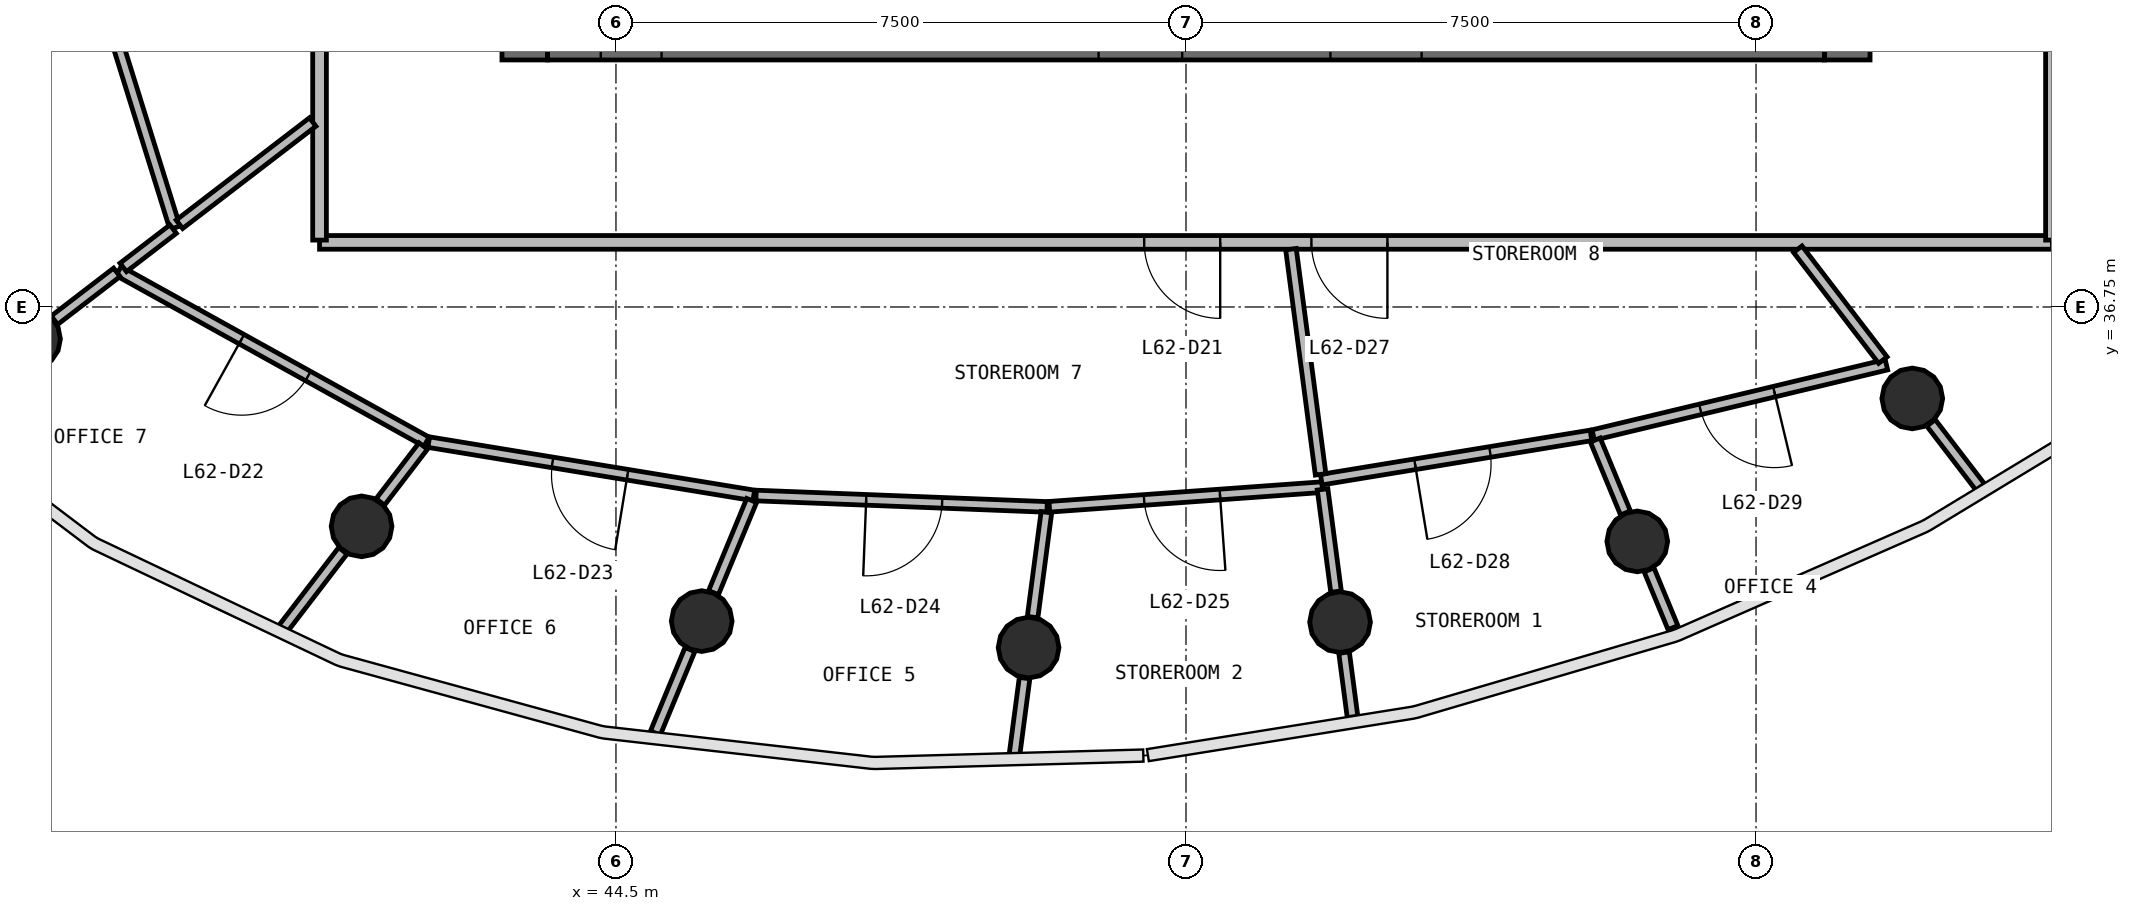
"""IFC4 building model, lengths in metres.
Left out: names, types, materials, properties, quantities, classifications, styles, units other than length and angle.
Written with IfcOpenShell. Run it as: python <this file> out.ifc"""

import sys

from ifc_helpers import new_model, si_unit, direction, frame, frame_2d, origin, origin_2d, place, context, subcontext, project, spatial, rectangle, circle, extrude, source, transform, mapped, element, fill, save


model = new_model("IFC4")
c1 = context("Model", 3, precision=1e-05, world=origin(), true_north=direction((0.0, 1.0)))
c2 = subcontext(c1, "Body", "Model", "MODEL_VIEW")
j1 = project(units=[si_unit("LENGTHUNIT", "METRE"), si_unit("PLANEANGLEUNIT", "RADIAN")], contexts=[c1])
p1 = place(None, origin())
s1 = spatial("IfcSite", under=j1, at=p1, CompositionType="ELEMENT")
p2 = place(p1, origin())
s2 = spatial("IfcBuilding", under=s1, at=p2, CompositionType="ELEMENT")
p3 = place(p2, frame((0.0, 0.0, 254.0)))
s3 = spatial("IfcBuildingStorey", under=s2, at=p3, CompositionType="ELEMENT", Elevation=254.0)
p4 = place(p3, frame((60.7, 40.0, 0.0), z_axis=(0.0, 0.0, 1.0), x_axis=(0.0, 1.0, 0.0)))
e1 = element("IfcWall", 1, at=p4, inside=s3, PredefinedType="SHEAR", context=c2, shape_type="SweptSolid", body=[
    extrude(rectangle(XDim=16.0, YDim=0.6, at=frame_2d((8.0, 0.0))), origin(), (0.0, 0.0, 1.0), 3.9),
])
p5 = place(p4, frame((7.1, 0.0, 0.0)))
e2 = element("IfcOpeningElement", 2, at=p5, cuts=e1, PredefinedType="OPENING", context=c2, shape_type="SweptSolid", body=[
    extrude(rectangle(XDim=1.8, YDim=2.1, at=frame_2d((0.9, 1.05))), frame((0.0, 0.31, 0.0), z_axis=(0.0, -1.0, 0.0), x_axis=(1.0, 0.0, 0.0)), (0.0, 0.0, 1.0), 0.62),
])
p6 = place(p3, frame((43.3, 56.0, 0.0), z_axis=(0.0, 0.0, 1.0), x_axis=(0.0, -1.0, 0.0)))
e3 = element("IfcWall", 3, at=p6, inside=s3, PredefinedType="SHEAR", context=c2, shape_type="SweptSolid", body=[
    extrude(rectangle(XDim=16.0, YDim=0.6, at=frame_2d((8.0, 0.0))), origin(), (0.0, 0.0, 1.0), 3.9),
])
p7 = place(p6, frame((7.1, 0.0, 0.0)))
e4 = element("IfcOpeningElement", 4, at=p7, cuts=e3, PredefinedType="OPENING", context=c2, shape_type="SweptSolid", body=[
    extrude(rectangle(XDim=1.8, YDim=2.1, at=frame_2d((0.9, 1.05))), frame((0.0, 0.31, 0.0), z_axis=(0.0, -1.0, 0.0), x_axis=(1.0, 0.0, 0.0)), (0.0, 0.0, 1.0), 0.62),
])
p8 = place(p3, frame((43.6, 40.3, 0.0), z_axis=(0.0, 0.0, 1.0), x_axis=(1.0, 0.0, 0.0)))
e5 = element("IfcWall", 5, at=p8, inside=s3, PredefinedType="SHEAR", context=c2, shape_type="SweptSolid", body=[
    extrude(rectangle(XDim=16.8, YDim=0.6, at=frame_2d((8.4, 0.0))), origin(), (0.0, 0.0, 1.0), 3.9),
])
p9 = place(p8, frame((10.3, 0.0, 0.0)))
e6 = element("IfcOpeningElement", 6, at=p9, cuts=e5, PredefinedType="OPENING", context=c2, shape_type="SweptSolid", body=[
    extrude(rectangle(XDim=1.2, YDim=2.1, at=frame_2d((0.6, 1.05))), frame((0.0, 0.31, 0.0), z_axis=(0.0, -1.0, 0.0), x_axis=(1.0, 0.0, 0.0)), (0.0, 0.0, 1.0), 0.62),
])
p10 = place(p8, frame((7.25, 0.0, 0.0)))
e7 = element("IfcOpeningElement", 7, at=p10, cuts=e5, PredefinedType="OPENING", context=c2, shape_type="SweptSolid", body=[
    extrude(rectangle(XDim=1.1, YDim=2.1, at=frame_2d((0.55, 1.05))), frame((0.0, 0.31, 0.0), z_axis=(0.0, -1.0, 0.0), x_axis=(1.0, 0.0, 0.0)), (0.0, 0.0, 1.0), 0.62),
])
p11 = place(p8, frame((0.7, 0.0, 0.0)))
e8 = element("IfcOpeningElement", 8, at=p11, cuts=e5, PredefinedType="OPENING", context=c2, shape_type="SweptSolid", body=[
    extrude(rectangle(XDim=0.8, YDim=2.1, at=frame_2d((0.4, 1.05))), frame((0.0, 0.31, 0.0), z_axis=(0.0, -1.0, 0.0), x_axis=(1.0, 0.0, 0.0)), (0.0, 0.0, 1.0), 0.62),
])
m1 = source(origin(), c2, "Body", "SweptSolid", [
    extrude(circle(Radius=0.4, at=origin_2d()), origin(), (0.0, 0.0, 1.0), 3.9),
])
for number, where, z_axis, x_axis in (
    (9, (36.791, 36.329, 0.0), (0.0, 0.0, 1.0), (1.0, 0.0, 0.0)),
    (10, (41.153, 33.864, 0.0), (0.0, 0.0, 1.0), (1.0, 0.0, 0.0)),
    (11, (45.628, 32.617, 0.0), (0.0, 0.0, 1.0), (1.0, 0.0, 0.0)),
    (12, (49.929, 32.269, 0.0), (0.0, 0.0, 1.0), (1.0, 0.0, 0.0)),
    (13, (54.027, 32.604, 0.0), (0.0, 0.0, 1.0), (1.0, 0.0, 0.0)),
    (14, (57.937, 33.666, 0.0), (0.0, 0.0, 1.0), (1.0, 0.0, 0.0)),
    (15, (61.556, 35.547, 0.0), (0.0, 0.0, 1.0), (1.0, 0.0, 0.0)),
):
    element("IfcColumn", number, at=place(p3, frame(where, z_axis=z_axis, x_axis=x_axis)), inside=s3, PredefinedType="COLUMN", context=c2, shape_type="MappedRepresentation", body=[
        mapped(m1, transform((0.0, 0.0, 0.0), scale=1.0)),
    ])
p12 = place(p3, frame((63.4, 37.6, 0.0), z_axis=(0.0, 0.0, 1.0), x_axis=(-1.0, 0.0, 0.0)))
e16 = element("IfcWall", 16, at=p12, inside=s3, PredefinedType="PARTITIONING", context=c2, shape_type="SweptSolid", body=[
    extrude(rectangle(XDim=22.8, YDim=0.18, at=frame_2d((11.4, 0.0))), origin(), (0.0, 0.0, 1.0), 2.88),
])
p13 = place(p12, frame((10.95, 0.0, 0.0)))
e17 = element("IfcOpeningElement", 17, at=p13, cuts=e16, PredefinedType="OPENING", context=c2, shape_type="SweptSolid", body=[
    extrude(rectangle(XDim=1.0, YDim=2.1, at=frame_2d((0.5, 1.05))), frame((0.0, 0.1, 0.0), z_axis=(0.0, -1.0, 0.0), x_axis=(1.0, 0.0, 0.0)), (0.0, 0.0, 1.0), 0.2),
])
p14 = place(p12, frame((8.75, 0.0, 0.0)))
e18 = element("IfcOpeningElement", 18, at=p14, cuts=e16, PredefinedType="OPENING", context=c2, shape_type="SweptSolid", body=[
    extrude(rectangle(XDim=1.0, YDim=2.1, at=frame_2d((0.5, 1.05))), frame((0.0, 0.1, 0.0), z_axis=(0.0, -1.0, 0.0), x_axis=(1.0, 0.0, 0.0)), (0.0, 0.0, 1.0), 0.2),
])
p15 = place(p3, frame((63.4, 58.37, 0.0), z_axis=(0.0, 0.0, 1.0), x_axis=(0.0, -1.0, 0.0)))
e19 = element("IfcWall", 19, at=p15, inside=s3, PredefinedType="PARTITIONING", context=c2, shape_type="SweptSolid", body=[
    extrude(rectangle(XDim=20.74, YDim=0.18, at=frame_2d((10.37, 0.0))), origin(), (0.0, 0.0, 1.0), 2.88),
])
p16 = place(p15, frame((15.49, 0.0, 0.0)))
e20 = element("IfcOpeningElement", 20, at=p16, cuts=e19, PredefinedType="OPENING", context=c2, shape_type="SweptSolid", body=[
    extrude(rectangle(XDim=1.0, YDim=2.1, at=frame_2d((0.5, 1.05))), frame((0.0, 0.1, 0.0), z_axis=(0.0, -1.0, 0.0), x_axis=(1.0, 0.0, 0.0)), (0.0, 0.0, 1.0), 0.2),
])
p17 = place(p15, frame((12.09, 0.0, 0.0)))
e21 = element("IfcOpeningElement", 21, at=p17, cuts=e19, PredefinedType="OPENING", context=c2, shape_type="SweptSolid", body=[
    extrude(rectangle(XDim=1.0, YDim=2.1, at=frame_2d((0.5, 1.05))), frame((0.0, 0.1, 0.0), z_axis=(0.0, -1.0, 0.0), x_axis=(1.0, 0.0, 0.0)), (0.0, 0.0, 1.0), 0.2),
])
p18 = place(p15, frame((9.89, 0.0, 0.0)))
e22 = element("IfcOpeningElement", 22, at=p18, cuts=e19, PredefinedType="OPENING", context=c2, shape_type="SweptSolid", body=[
    extrude(rectangle(XDim=1.0, YDim=2.1, at=frame_2d((0.5, 1.05))), frame((0.0, 0.1, 0.0), z_axis=(0.0, -1.0, 0.0), x_axis=(1.0, 0.0, 0.0)), (0.0, 0.0, 1.0), 0.2),
])
p19 = place(p3, frame((40.6, 37.63, 0.0), z_axis=(0.0, 0.0, 1.0), x_axis=(0.0, 1.0, 0.0)))
e23 = element("IfcWall", 23, at=p19, inside=s3, PredefinedType="PARTITIONING", context=c2, shape_type="SweptSolid", body=[
    extrude(rectangle(XDim=20.74, YDim=0.18, at=frame_2d((10.37, 0.0))), origin(), (0.0, 0.0, 1.0), 2.88),
])
p20 = place(p19, frame((7.79, 0.0, 0.0)))
e24 = element("IfcOpeningElement", 24, at=p20, cuts=e23, PredefinedType="OPENING", context=c2, shape_type="SweptSolid", body=[
    extrude(rectangle(XDim=0.9, YDim=2.1, at=frame_2d((0.45, 1.05))), frame((0.0, 0.1, 0.0), z_axis=(0.0, -1.0, 0.0), x_axis=(1.0, 0.0, 0.0)), (0.0, 0.0, 1.0), 0.2),
])
p21 = place(p19, frame((4.39, 0.0, 0.0)))
e25 = element("IfcOpeningElement", 25, at=p21, cuts=e23, PredefinedType="OPENING", context=c2, shape_type="SweptSolid", body=[
    extrude(rectangle(XDim=0.9, YDim=2.1, at=frame_2d((0.45, 1.05))), frame((0.0, 0.1, 0.0), z_axis=(0.0, -1.0, 0.0), x_axis=(1.0, 0.0, 0.0)), (0.0, 0.0, 1.0), 0.2),
])
p22 = place(p19, frame((9.89, 0.0, 0.0)))
e26 = element("IfcOpeningElement", 26, at=p22, cuts=e23, PredefinedType="OPENING", context=c2, shape_type="SweptSolid", body=[
    extrude(rectangle(XDim=1.0, YDim=2.1, at=frame_2d((0.5, 1.05))), frame((0.0, 0.1, 0.0), z_axis=(0.0, -1.0, 0.0), x_axis=(1.0, 0.0, 0.0)), (0.0, 0.0, 1.0), 0.2),
])
p23 = place(p3, frame((42.007, 34.977, 0.0), z_axis=(0.0, 0.0, 1.0), x_axis=(-0.874440561865, 0.485132666149, 0.0)))
e27 = element("IfcWall", 27, at=p23, inside=s3, PredefinedType="PARTITIONING", context=c2, shape_type="SweptSolid", body=[
    extrude(rectangle(XDim=4.632, YDim=0.14, at=frame_2d((2.316, 0.0))), origin(), (0.0, 0.0, 1.0), 2.88),
])
p24 = place(p23, frame((1.782, 0.0, 0.0)))
e28 = element("IfcOpeningElement", 28, at=p24, cuts=e27, PredefinedType="OPENING", context=c2, shape_type="SweptSolid", body=[
    extrude(rectangle(XDim=1.0, YDim=2.1, at=frame_2d((0.5, 1.05))), frame((0.0, 0.08, 0.0), z_axis=(0.0, -1.0, 0.0), x_axis=(1.0, 0.0, 0.0)), (0.0, 0.0, 1.0), 0.16),
])
p25 = place(p3, frame((46.313, 34.271, 0.0), z_axis=(0.0, 0.0, 1.0), x_axis=(-0.986813949389, 0.161858670735, 0.0)))
e29 = element("IfcWall", 29, at=p25, inside=s3, PredefinedType="PARTITIONING", context=c2, shape_type="SweptSolid", body=[
    extrude(rectangle(XDim=4.333, YDim=0.14, at=frame_2d((2.167, 0.0))), origin(), (0.0, 0.0, 1.0), 2.88),
])
p26 = place(p25, frame((1.684, 0.0, 0.0)))
e30 = element("IfcOpeningElement", 30, at=p26, cuts=e29, PredefinedType="OPENING", context=c2, shape_type="SweptSolid", body=[
    extrude(rectangle(XDim=1.0, YDim=2.1, at=frame_2d((0.5, 1.05))), frame((0.0, 0.08, 0.0), z_axis=(0.0, -1.0, 0.0), x_axis=(1.0, 0.0, 0.0)), (0.0, 0.0, 1.0), 0.16),
])
p27 = place(p3, frame((37.402, 41.953, 0.0), z_axis=(0.0, 0.0, 1.0), x_axis=(0.297324216062, -0.954776576244, 0.0)))
e31 = element("IfcWall", 31, at=p27, inside=s3, PredefinedType="PARTITIONING", context=c2, shape_type="SweptSolid", body=[
    extrude(rectangle(XDim=4.358, YDim=0.14, at=frame_2d((2.179, 0.0))), origin(), (0.0, 0.0, 1.0), 2.88),
])
p28 = place(p3, frame((61.215, 35.99, 0.0), z_axis=(0.0, 0.0, 1.0), x_axis=(-0.972446486368, -0.233126212921, 0.0)))
e32 = element("IfcWall", 32, at=p28, inside=s3, PredefinedType="PARTITIONING", context=c2, shape_type="SweptSolid", body=[
    extrude(rectangle(XDim=3.967, YDim=0.14, at=frame_2d((1.983, 0.0))), origin(), (0.0, 0.0, 1.0), 2.88),
])
p29 = place(p28, frame((1.517, 0.0, 0.0)))
e33 = element("IfcOpeningElement", 33, at=p29, cuts=e32, PredefinedType="OPENING", context=c2, shape_type="SweptSolid", body=[
    extrude(rectangle(XDim=1.0, YDim=2.1, at=frame_2d((0.5, 1.05))), frame((0.0, 0.08, 0.0), z_axis=(0.0, -1.0, 0.0), x_axis=(1.0, 0.0, 0.0)), (0.0, 0.0, 1.0), 0.16),
])
p30 = place(p3, frame((50.173, 34.119, 0.0), z_axis=(0.0, 0.0, 1.0), x_axis=(-0.999232293047, 0.039176836684, 0.0)))
e34 = element("IfcWall", 34, at=p30, inside=s3, PredefinedType="PARTITIONING", context=c2, shape_type="SweptSolid", body=[
    extrude(rectangle(XDim=3.833, YDim=0.14, at=frame_2d((1.916, 0.0))), origin(), (0.0, 0.0, 1.0), 2.88),
])
p31 = place(p30, frame((1.382, 0.0, 0.0)))
e35 = element("IfcOpeningElement", 35, at=p31, cuts=e34, PredefinedType="OPENING", context=c2, shape_type="SweptSolid", body=[
    extrude(rectangle(XDim=1.0, YDim=2.1, at=frame_2d((0.5, 1.05))), frame((0.0, 0.08, 0.0), z_axis=(0.0, -1.0, 0.0), x_axis=(1.0, 0.0, 0.0)), (0.0, 0.0, 1.0), 0.16),
])
p32 = place(p3, frame((53.793, 34.38, 0.0), z_axis=(0.0, 0.0, 1.0), x_axis=(-0.997422773101, -0.07174825224, 0.0)))
e36 = element("IfcWall", 36, at=p32, inside=s3, PredefinedType="PARTITIONING", context=c2, shape_type="SweptSolid", body=[
    extrude(rectangle(XDim=3.6, YDim=0.14, at=frame_2d((1.8, 0.0))), origin(), (0.0, 0.0, 1.0), 2.88),
])
p33 = place(p32, frame((1.35, 0.0, 0.0)))
e37 = element("IfcOpeningElement", 37, at=p33, cuts=e36, PredefinedType="OPENING", context=c2, shape_type="SweptSolid", body=[
    extrude(rectangle(XDim=1.0, YDim=2.1, at=frame_2d((0.5, 1.05))), frame((0.0, 0.08, 0.0), z_axis=(0.0, -1.0, 0.0), x_axis=(1.0, 0.0, 0.0)), (0.0, 0.0, 1.0), 0.16),
])
p34 = place(p3, frame((57.328, 35.061, 0.0), z_axis=(0.0, 0.0, 1.0), x_axis=(-0.98678747137, -0.162020018352, 0.0)))
e38 = element("IfcWall", 38, at=p34, inside=s3, PredefinedType="PARTITIONING", context=c2, shape_type="SweptSolid", body=[
    extrude(rectangle(XDim=3.595, YDim=0.14, at=frame_2d((1.798, 0.0))), origin(), (0.0, 0.0, 1.0), 2.88),
])
p35 = place(p34, frame((1.345, 0.0, 0.0)))
e39 = element("IfcOpeningElement", 39, at=p35, cuts=e38, PredefinedType="OPENING", context=c2, shape_type="SweptSolid", body=[
    extrude(rectangle(XDim=1.0, YDim=2.1, at=frame_2d((0.5, 1.05))), frame((0.0, 0.08, 0.0), z_axis=(0.0, -1.0, 0.0), x_axis=(1.0, 0.0, 0.0)), (0.0, 0.0, 1.0), 0.16),
])
p36 = place(p3, frame((53.381, 37.51, 0.0), z_axis=(0.0, 0.0, 1.0), x_axis=(0.130488330544, -0.991449845223, 0.0)))
e40 = element("IfcWall", 40, at=p36, inside=s3, PredefinedType="PARTITIONING", context=c2, shape_type="SweptSolid", body=[
    extrude(rectangle(XDim=2.988, YDim=0.14, at=frame_2d((1.494, 0.0))), origin(), (0.0, 0.0, 1.0), 2.88),
])
p37 = place(p3, frame((40.51, 39.183, 0.0), z_axis=(0.0, 0.0, 1.0), x_axis=(-0.793391200756, -0.608712085113, 0.0)))
e41 = element("IfcWall", 41, at=p37, inside=s3, PredefinedType="PARTITIONING", context=c2, shape_type="SweptSolid", body=[
    extrude(rectangle(XDim=2.21, YDim=0.14, at=frame_2d((1.105, 0.0))), origin(), (0.0, 0.0, 1.0), 2.88),
])
p38 = place(p3, frame((60.049, 37.51, 0.0), z_axis=(0.0, 0.0, 1.0), x_axis=(0.608715796481, -0.793388353276, 0.0)))
e42 = element("IfcWall", 42, at=p38, inside=s3, PredefinedType="PARTITIONING", context=c2, shape_type="SweptSolid", body=[
    extrude(rectangle(XDim=1.839, YDim=0.14, at=frame_2d((0.919, 0.0))), origin(), (0.0, 0.0, 1.0), 2.88),
])
p39 = place(p3, frame((50.163, 34.05, 0.0), z_axis=(0.0, 0.0, 1.0), x_axis=(-0.130508963951, -0.991447129366, 0.0)))
e43 = element("IfcWall", 43, at=p39, inside=s3, PredefinedType="PARTITIONING", context=c2, shape_type="SweptSolid", body=[
    extrude(rectangle(XDim=1.392, YDim=0.14, at=frame_2d((0.696, 0.0))), origin(), (0.0, 0.0, 1.0), 2.88),
])
p40 = place(p3, frame((53.797, 34.35, 0.0), z_axis=(0.0, 0.0, 1.0), x_axis=(0.130431243658, -0.991457356964, 0.0)))
e44 = element("IfcWall", 44, at=p40, inside=s3, PredefinedType="PARTITIONING", context=c2, shape_type="SweptSolid", body=[
    extrude(rectangle(XDim=1.357, YDim=0.14, at=frame_2d((0.678, 0.0))), origin(), (0.0, 0.0, 1.0), 2.88),
])
p41 = place(p3, frame((46.286, 34.204, 0.0), z_axis=(0.0, 0.0, 1.0), x_axis=(-0.382778880787, -0.923839990704, 0.0)))
e45 = element("IfcWall", 45, at=p41, inside=s3, PredefinedType="PARTITIONING", context=c2, shape_type="SweptSolid", body=[
    extrude(rectangle(XDim=1.312, YDim=0.14, at=frame_2d((0.656, 0.0))), origin(), (0.0, 0.0, 1.0), 2.88),
])
p42 = place(p3, frame((40.907, 33.543, 0.0), z_axis=(0.0, 0.0, 1.0), x_axis=(-0.608700288014, -0.793400251683, 0.0)))
e46 = element("IfcWall", 46, at=p42, inside=s3, PredefinedType="PARTITIONING", context=c2, shape_type="SweptSolid", body=[
    extrude(rectangle(XDim=1.297, YDim=0.14, at=frame_2d((0.648, 0.0))), origin(), (0.0, 0.0, 1.0), 2.88),
])
p43 = place(p3, frame((45.473, 32.243, 0.0), z_axis=(0.0, 0.0, 1.0), x_axis=(-0.382762861593, -0.923846627847, 0.0)))
e47 = element("IfcWall", 47, at=p43, inside=s3, PredefinedType="PARTITIONING", context=c2, shape_type="SweptSolid", body=[
    extrude(rectangle(XDim=1.189, YDim=0.14, at=frame_2d((0.594, 0.0))), origin(), (0.0, 0.0, 1.0), 2.88),
])
p44 = place(p3, frame((57.385, 35.0, 0.0), z_axis=(0.0, 0.0, 1.0), x_axis=(0.38262856197, -0.923902258664, 0.0)))
e48 = element("IfcWall", 48, at=p44, inside=s3, PredefinedType="PARTITIONING", context=c2, shape_type="SweptSolid", body=[
    extrude(rectangle(XDim=1.039, YDim=0.14, at=frame_2d((0.52, 0.0))), origin(), (0.0, 0.0, 1.0), 2.88),
])
p45 = place(p3, frame((37.933, 37.206, 0.0), z_axis=(0.0, 0.0, 1.0), x_axis=(-0.79327224319, -0.608867102235, 0.0)))
e49 = element("IfcWall", 49, at=p45, inside=s3, PredefinedType="PARTITIONING", context=c2, shape_type="SweptSolid", body=[
    extrude(rectangle(XDim=1.035, YDim=0.14, at=frame_2d((0.518, 0.0))), origin(), (0.0, 0.0, 1.0), 2.88),
])
p46 = place(p3, frame((61.802, 35.226, 0.0), z_axis=(0.0, 0.0, 1.0), x_axis=(0.608691318636, -0.793407132951, 0.0)))
e50 = element("IfcWall", 50, at=p46, inside=s3, PredefinedType="PARTITIONING", context=c2, shape_type="SweptSolid", body=[
    extrude(rectangle(XDim=1.065, YDim=0.14, at=frame_2d((0.533, 0.0))), origin(), (0.0, 0.0, 1.0), 2.88),
])
p47 = place(p3, frame((49.876, 31.868, 0.0), z_axis=(0.0, 0.0, 1.0), x_axis=(-0.130744047455, -0.991416155837, 0.0)))
e51 = element("IfcWall", 51, at=p47, inside=s3, PredefinedType="PARTITIONING", context=c2, shape_type="SweptSolid", body=[
    extrude(rectangle(XDim=1.025, YDim=0.14, at=frame_2d((0.513, 0.0))), origin(), (0.0, 0.0, 1.0), 2.88),
])
p48 = place(p3, frame((41.964, 34.921, 0.0), z_axis=(0.0, 0.0, 1.0), x_axis=(-0.608807228155, -0.79331819527, 0.0)))
e52 = element("IfcWall", 52, at=p48, inside=s3, PredefinedType="PARTITIONING", context=c2, shape_type="SweptSolid", body=[
    extrude(rectangle(XDim=0.927, YDim=0.14, at=frame_2d((0.464, 0.0))), origin(), (0.0, 0.0, 1.0), 2.88),
])
p49 = place(p3, frame((38.673, 37.774, 0.0), z_axis=(0.0, 0.0, 1.0), x_axis=(-0.793325907002, -0.608797179099, 0.0)))
e53 = element("IfcWall", 53, at=p49, inside=s3, PredefinedType="PARTITIONING", context=c2, shape_type="SweptSolid", body=[
    extrude(rectangle(XDim=0.827, YDim=0.14, at=frame_2d((0.414, 0.0))), origin(), (0.0, 0.0, 1.0), 2.88),
])
p50 = place(p3, frame((54.08, 32.203, 0.0), z_axis=(0.0, 0.0, 1.0), x_axis=(0.130720882624, -0.991419210448, 0.0)))
e54 = element("IfcWall", 54, at=p50, inside=s3, PredefinedType="PARTITIONING", context=c2, shape_type="SweptSolid", body=[
    extrude(rectangle(XDim=0.854, YDim=0.14, at=frame_2d((0.427, 0.0))), origin(), (0.0, 0.0, 1.0), 2.88),
])
p51 = place(p3, frame((58.092, 33.292, 0.0), z_axis=(0.0, 0.0, 1.0), x_axis=(0.382762017913, -0.923846977396, 0.0)))
e55 = element("IfcWall", 55, at=p51, inside=s3, PredefinedType="PARTITIONING", context=c2, shape_type="SweptSolid", body=[
    extrude(rectangle(XDim=0.823, YDim=0.14, at=frame_2d((0.412, 0.0))), origin(), (0.0, 0.0, 1.0), 2.88),
])
m2 = source(origin(), c2, "Body", "SweptSolid", [
    extrude(rectangle(XDim=1.0, YDim=2.1, at=frame_2d((0.5, 1.05))), frame((0.0, 0.025, 0.0), z_axis=(0.0, -1.0, 0.0), x_axis=(1.0, 0.0, 0.0)), (0.0, 0.0, 1.0), 0.05),
])
p52 = place(p13, origin())
e56 = element("IfcDoor", 56, at=p52, inside=s3, OperationType="SINGLE_SWING_LEFT", PredefinedType="DOOR", context=c2, shape_type="MappedRepresentation", body=[
    mapped(m2, transform((0.0, 0.0, 0.0), scale=1.0)),
])
fill(e17, e56)
p53 = place(p24, origin())
e57 = element("IfcDoor", 57, at=p53, inside=s3, OperationType="SINGLE_SWING_RIGHT", PredefinedType="DOOR", context=c2, shape_type="MappedRepresentation", body=[
    mapped(m2, transform((0.0, 0.0, 0.0), scale=1.0)),
])
fill(e28, e57)
p54 = place(p26, origin())
e58 = element("IfcDoor", 58, at=p54, inside=s3, OperationType="SINGLE_SWING_LEFT", PredefinedType="DOOR", context=c2, shape_type="MappedRepresentation", body=[
    mapped(m2, transform((0.0, 0.0, 0.0), scale=1.0)),
])
fill(e30, e58)
p55 = place(p31, origin())
e59 = element("IfcDoor", 59, at=p55, inside=s3, OperationType="SINGLE_SWING_RIGHT", PredefinedType="DOOR", context=c2, shape_type="MappedRepresentation", body=[
    mapped(m2, transform((0.0, 0.0, 0.0), scale=1.0)),
])
fill(e35, e59)
p56 = place(p33, origin())
e60 = element("IfcDoor", 60, at=p56, inside=s3, OperationType="SINGLE_SWING_LEFT", PredefinedType="DOOR", context=c2, shape_type="MappedRepresentation", body=[
    mapped(m2, transform((0.0, 0.0, 0.0), scale=1.0)),
])
fill(e37, e60)
p57 = place(p14, origin())
e61 = element("IfcDoor", 61, at=p57, inside=s3, OperationType="SINGLE_SWING_LEFT", PredefinedType="DOOR", context=c2, shape_type="MappedRepresentation", body=[
    mapped(m2, transform((0.0, 0.0, 0.0), scale=1.0)),
])
fill(e18, e61)
p58 = place(p35, origin())
e62 = element("IfcDoor", 62, at=p58, inside=s3, OperationType="SINGLE_SWING_RIGHT", PredefinedType="DOOR", context=c2, shape_type="MappedRepresentation", body=[
    mapped(m2, transform((0.0, 0.0, 0.0), scale=1.0)),
])
fill(e39, e62)
p59 = place(p29, origin())
e63 = element("IfcDoor", 63, at=p59, inside=s3, OperationType="SINGLE_SWING_LEFT", PredefinedType="DOOR", context=c2, shape_type="MappedRepresentation", body=[
    mapped(m2, transform((0.0, 0.0, 0.0), scale=1.0)),
])
fill(e33, e63)
save(model, sys.argv[1])
